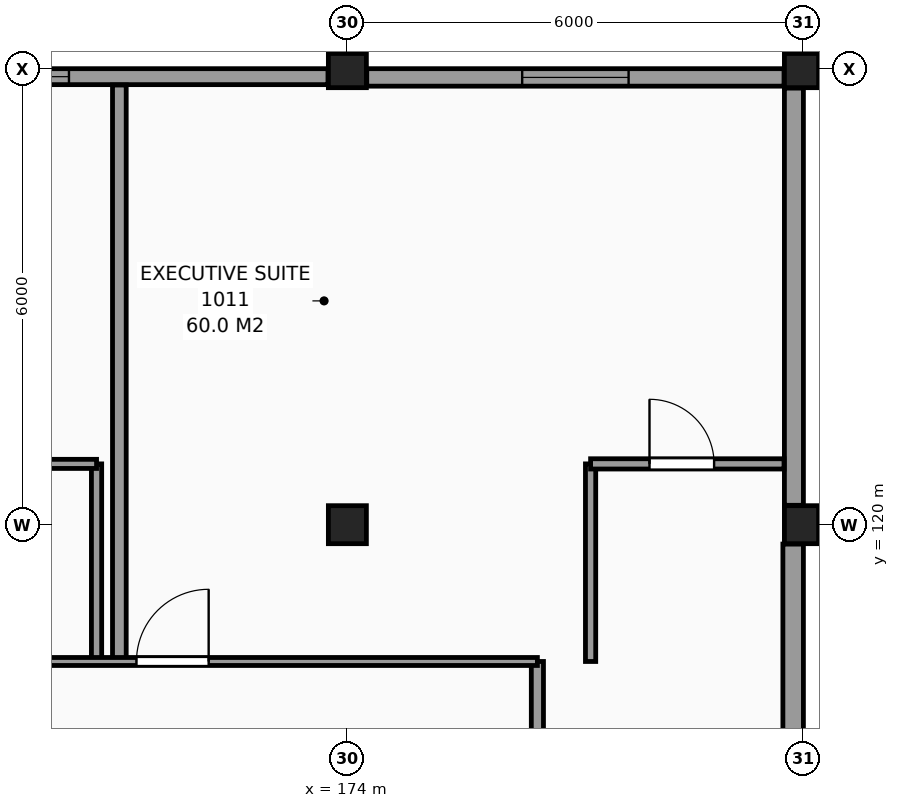
"""IFC4 building model, lengths in metres.
Left out: names, types, materials, properties, quantities, classifications, styles, units other than length and angle.
Written with IfcOpenShell. Run it as: python <this file> out.ifc"""

import sys

from ifc_helpers import new_model, si_unit, direction, frame, frame_2d, origin, origin_2d, place, context, subcontext, project, spatial, rectangle, extrude, element, fill, save


model = new_model("IFC4")
c1 = context("Model", 3, precision=1e-05, world=origin(), true_north=direction((0.0, 1.0)))
c2 = subcontext(c1, "Body", "Model", "MODEL_VIEW")
j1 = project(units=[si_unit("LENGTHUNIT", "METRE"), si_unit("PLANEANGLEUNIT", "RADIAN")], contexts=[c1])
p1 = place(None, origin())
s1 = spatial("IfcSite", under=j1, at=p1, CompositionType="ELEMENT")
p2 = place(p1, origin())
s2 = spatial("IfcBuilding", under=s1, at=p2, CompositionType="ELEMENT")
p3 = place(p2, frame((0.0, 0.0, 41.4)))
s3 = spatial("IfcBuildingStorey", under=s2, at=p3, CompositionType="ELEMENT", Elevation=41.4)
for number, where, z_axis, x_axis in (
    (1, (174.0, 120.0, 0.0), (0.0, 0.0, 1.0), (1.0, 0.0, 0.0)),
    (2, (174.0, 126.0, 0.0), (0.0, 0.0, 1.0), (1.0, 0.0, 0.0)),
    (3, (180.0, 120.0, 0.0), (0.0, 0.0, 1.0), (1.0, 0.0, 0.0)),
    (4, (180.0, 126.0, 0.0), (0.0, 0.0, 1.0), (1.0, 0.0, 0.0)),
):
    element("IfcColumn", number, at=place(p3, frame(where, z_axis=z_axis, x_axis=x_axis)), inside=s3, PredefinedType="COLUMN", context=c2, shape_type="SweptSolid", body=[
        extrude(rectangle(XDim=0.5, YDim=0.5, at=origin_2d()), origin(), (0.0, 0.0, 1.0), 3.3),
    ])
p4 = place(p3, frame((179.865, 114.255, 0.0), z_axis=(0.0, 0.0, 1.0), x_axis=(0.0, 1.0, 0.0)))
e5 = element("IfcWall", 5, at=p4, inside=s3, PredefinedType="SOLIDWALL", context=c2, shape_type="SweptSolid", body=[
    extrude(rectangle(XDim=5.49, YDim=0.27, at=frame_2d((2.745, 0.0))), origin(), (0.0, 0.0, 1.0), 2.41),
])
p5 = place(p3, frame((179.875, 120.255, 0.0), z_axis=(0.0, 0.0, 1.0), x_axis=(0.0, 1.0, 0.0)))
e6 = element("IfcWall", 6, at=p5, inside=s3, PredefinedType="SOLIDWALL", context=c2, shape_type="SweptSolid", body=[
    extrude(rectangle(XDim=5.49, YDim=0.25, at=frame_2d((2.745, 0.0))), origin(), (0.0, 0.0, 1.0), 2.41),
])
p6 = place(p3, frame((179.745, 125.885, 0.0), z_axis=(0.0, 0.0, 1.0), x_axis=(-1.0, 0.0, 0.0)))
e7 = element("IfcWall", 7, at=p6, inside=s3, PredefinedType="SOLIDWALL", context=c2, shape_type="SweptSolid", body=[
    extrude(rectangle(XDim=5.49, YDim=0.23, at=frame_2d((2.745, 0.0))), origin(), (0.0, 0.0, 1.0), 2.41),
])
p7 = place(p6, frame((2.045, 0.0, 0.8)))
e8 = element("IfcOpeningElement", 8, at=p7, cuts=e7, PredefinedType="OPENING", context=c2, shape_type="SweptSolid", body=[
    extrude(rectangle(XDim=1.4, YDim=1.4, at=frame_2d((0.7, 0.7))), frame((0.0, 0.125, 0.0), z_axis=(0.0, -1.0, 0.0), x_axis=(1.0, 0.0, 0.0)), (0.0, 0.0, 1.0), 0.25),
])
p8 = place(p3, frame((173.745, 125.895, 0.0), z_axis=(0.0, 0.0, 1.0), x_axis=(-1.0, 0.0, 0.0)))
e9 = element("IfcWall", 9, at=p8, inside=s3, PredefinedType="SOLIDWALL", context=c2, shape_type="SweptSolid", body=[
    extrude(rectangle(XDim=5.49, YDim=0.21, at=frame_2d((2.745, 0.0))), origin(), (0.0, 0.0, 1.0), 2.41),
])
p9 = place(p8, frame((3.408, 0.0, 0.8)))
e10 = element("IfcOpeningElement", 10, at=p9, cuts=e9, PredefinedType="OPENING", context=c2, shape_type="SweptSolid", body=[
    extrude(rectangle(XDim=1.4, YDim=1.4, at=frame_2d((0.7, 0.7))), frame((0.0, 0.115, 0.0), z_axis=(0.0, -1.0, 0.0), x_axis=(1.0, 0.0, 0.0)), (0.0, 0.0, 1.0), 0.23),
])
p10 = place(p3, frame((170.7, 118.2, 0.0), z_axis=(0.0, 0.0, 1.0), x_axis=(0.0, 1.0, 0.0)))
e11 = element("IfcWall", 11, at=p10, inside=s3, PredefinedType="PARTITIONING", context=c2, shape_type="SweptSolid", body=[
    extrude(rectangle(XDim=2.6, YDim=0.135, at=frame_2d((1.3, 0.0))), origin(), (0.0, 0.0, 1.0), 3.06),
])
p11 = place(p3, frame((171.0, 118.2, 0.0), z_axis=(0.0, 0.0, 1.0), x_axis=(0.0, 1.0, 0.0)))
e12 = element("IfcWall", 12, at=p11, inside=s3, PredefinedType="PARTITIONING", context=c2, shape_type="SweptSolid", body=[
    extrude(rectangle(XDim=7.585, YDim=0.18, at=frame_2d((3.792, 0.0))), origin(), (0.0, 0.0, 1.0), 3.06),
])
p12 = place(p3, frame((176.5, 115.8, 0.0), z_axis=(0.0, 0.0, 1.0), x_axis=(0.0, 1.0, 0.0)))
e13 = element("IfcWall", 13, at=p12, inside=s3, PredefinedType="PARTITIONING", context=c2, shape_type="SweptSolid", body=[
    extrude(rectangle(XDim=2.4, YDim=0.16, at=frame_2d((1.2, 0.0))), origin(), (0.0, 0.0, 1.0), 3.06),
])
p13 = place(p3, frame((177.2, 118.2, 0.0), z_axis=(0.0, 0.0, 1.0), x_axis=(0.0, 1.0, 0.0)))
e14 = element("IfcWall", 14, at=p13, inside=s3, PredefinedType="PARTITIONING", context=c2, shape_type="SweptSolid", body=[
    extrude(rectangle(XDim=2.6, YDim=0.135, at=frame_2d((1.3, 0.0))), origin(), (0.0, 0.0, 1.0), 3.06),
])
p14 = place(p3, frame((102.275, 118.2, 0.0), z_axis=(0.0, 0.0, 1.0), x_axis=(1.0, 0.0, 0.0)))
e15 = element("IfcWall", 15, at=p14, inside=s3, PredefinedType="PARTITIONING", context=c2, shape_type="SweptSolid", body=[
    extrude(rectangle(XDim=74.225, YDim=0.105, at=frame_2d((37.113, 0.0))), origin(), (0.0, 0.0, 1.0), 3.06),
])
p15 = place(p14, frame((7.55, 0.0, 0.0)))
e16 = element("IfcOpeningElement", 16, at=p15, cuts=e15, PredefinedType="OPENING", context=c2, shape_type="SweptSolid", body=[
    extrude(rectangle(XDim=0.95, YDim=2.1, at=frame_2d((0.475, 1.05))), frame((0.0, 0.062, 0.0), z_axis=(0.0, -1.0, 0.0), x_axis=(1.0, 0.0, 0.0)), (0.0, 0.0, 1.0), 0.125),
])
p16 = place(p14, frame((9.35, 0.0, 0.0)))
e17 = element("IfcOpeningElement", 17, at=p16, cuts=e15, PredefinedType="OPENING", context=c2, shape_type="SweptSolid", body=[
    extrude(rectangle(XDim=0.95, YDim=2.1, at=frame_2d((0.475, 1.05))), frame((0.0, 0.062, 0.0), z_axis=(0.0, -1.0, 0.0), x_axis=(1.0, 0.0, 0.0)), (0.0, 0.0, 1.0), 0.125),
])
p17 = place(p14, frame((24.05, 0.0, 0.0)))
e18 = element("IfcOpeningElement", 18, at=p17, cuts=e15, PredefinedType="OPENING", context=c2, shape_type="SweptSolid", body=[
    extrude(rectangle(XDim=0.95, YDim=2.1, at=frame_2d((0.475, 1.05))), frame((0.0, 0.062, 0.0), z_axis=(0.0, -1.0, 0.0), x_axis=(1.0, 0.0, 0.0)), (0.0, 0.0, 1.0), 0.125),
])
p18 = place(p14, frame((28.25, 0.0, 0.0)))
e19 = element("IfcOpeningElement", 19, at=p18, cuts=e15, PredefinedType="OPENING", context=c2, shape_type="SweptSolid", body=[
    extrude(rectangle(XDim=0.95, YDim=2.1, at=frame_2d((0.475, 1.05))), frame((0.0, 0.062, 0.0), z_axis=(0.0, -1.0, 0.0), x_axis=(1.0, 0.0, 0.0)), (0.0, 0.0, 1.0), 0.125),
])
p19 = place(p14, frame((30.45, 0.0, 0.0)))
e20 = element("IfcOpeningElement", 20, at=p19, cuts=e15, PredefinedType="OPENING", context=c2, shape_type="SweptSolid", body=[
    extrude(rectangle(XDim=0.95, YDim=2.1, at=frame_2d((0.475, 1.05))), frame((0.0, 0.062, 0.0), z_axis=(0.0, -1.0, 0.0), x_axis=(1.0, 0.0, 0.0)), (0.0, 0.0, 1.0), 0.125),
])
p20 = place(p14, frame((36.45, 0.0, 0.0)))
e21 = element("IfcOpeningElement", 21, at=p20, cuts=e15, PredefinedType="OPENING", context=c2, shape_type="SweptSolid", body=[
    extrude(rectangle(XDim=0.95, YDim=2.1, at=frame_2d((0.475, 1.05))), frame((0.0, 0.062, 0.0), z_axis=(0.0, -1.0, 0.0), x_axis=(1.0, 0.0, 0.0)), (0.0, 0.0, 1.0), 0.125),
])
p21 = place(p14, frame((46.25, 0.0, 0.0)))
e22 = element("IfcOpeningElement", 22, at=p21, cuts=e15, PredefinedType="OPENING", context=c2, shape_type="SweptSolid", body=[
    extrude(rectangle(XDim=0.95, YDim=2.1, at=frame_2d((0.475, 1.05))), frame((0.0, 0.062, 0.0), z_axis=(0.0, -1.0, 0.0), x_axis=(1.0, 0.0, 0.0)), (0.0, 0.0, 1.0), 0.125),
])
p22 = place(p14, frame((48.45, 0.0, 0.0)))
e23 = element("IfcOpeningElement", 23, at=p22, cuts=e15, PredefinedType="OPENING", context=c2, shape_type="SweptSolid", body=[
    extrude(rectangle(XDim=0.95, YDim=2.1, at=frame_2d((0.475, 1.05))), frame((0.0, 0.062, 0.0), z_axis=(0.0, -1.0, 0.0), x_axis=(1.0, 0.0, 0.0)), (0.0, 0.0, 1.0), 0.125),
])
p23 = place(p14, frame((62.3, 0.0, 0.0)))
e24 = element("IfcOpeningElement", 24, at=p23, cuts=e15, PredefinedType="OPENING", context=c2, shape_type="SweptSolid", body=[
    extrude(rectangle(XDim=0.95, YDim=2.1, at=frame_2d((0.475, 1.05))), frame((0.0, 0.062, 0.0), z_axis=(0.0, -1.0, 0.0), x_axis=(1.0, 0.0, 0.0)), (0.0, 0.0, 1.0), 0.125),
])
p24 = place(p14, frame((64.85, 0.0, 0.0)))
e25 = element("IfcOpeningElement", 25, at=p24, cuts=e15, PredefinedType="OPENING", context=c2, shape_type="SweptSolid", body=[
    extrude(rectangle(XDim=0.95, YDim=2.1, at=frame_2d((0.475, 1.05))), frame((0.0, 0.062, 0.0), z_axis=(0.0, -1.0, 0.0), x_axis=(1.0, 0.0, 0.0)), (0.0, 0.0, 1.0), 0.125),
])
p25 = place(p14, frame((68.95, 0.0, 0.0)))
e26 = element("IfcOpeningElement", 26, at=p25, cuts=e15, PredefinedType="OPENING", context=c2, shape_type="SweptSolid", body=[
    extrude(rectangle(XDim=0.95, YDim=2.1, at=frame_2d((0.475, 1.05))), frame((0.0, 0.062, 0.0), z_axis=(0.0, -1.0, 0.0), x_axis=(1.0, 0.0, 0.0)), (0.0, 0.0, 1.0), 0.125),
])
p26 = place(p3, frame((168.5, 120.8, 0.0), z_axis=(0.0, 0.0, 1.0), x_axis=(1.0, 0.0, 0.0)))
e27 = element("IfcWall", 27, at=p26, inside=s3, PredefinedType="PARTITIONING", context=c2, shape_type="SweptSolid", body=[
    extrude(rectangle(XDim=2.2, YDim=0.12, at=frame_2d((1.1, 0.0))), origin(), (0.0, 0.0, 1.0), 3.06),
])
p27 = place(p26, frame((0.675, 0.0, 0.0)))
e28 = element("IfcOpeningElement", 28, at=p27, cuts=e27, PredefinedType="OPENING", context=c2, shape_type="SweptSolid", body=[
    extrude(rectangle(XDim=0.85, YDim=2.1, at=frame_2d((0.425, 1.05))), frame((0.0, 0.07, 0.0), z_axis=(0.0, -1.0, 0.0), x_axis=(1.0, 0.0, 0.0)), (0.0, 0.0, 1.0), 0.14),
])
p28 = place(p3, frame((177.2, 120.8, 0.0), z_axis=(0.0, 0.0, 1.0), x_axis=(1.0, 0.0, 0.0)))
e29 = element("IfcWall", 29, at=p28, inside=s3, PredefinedType="PARTITIONING", context=c2, shape_type="SweptSolid", body=[
    extrude(rectangle(XDim=2.545, YDim=0.135, at=frame_2d((1.272, 0.0))), origin(), (0.0, 0.0, 1.0), 3.06),
])
p29 = place(p28, frame((0.775, 0.0, 0.0)))
e30 = element("IfcOpeningElement", 30, at=p29, cuts=e29, PredefinedType="OPENING", context=c2, shape_type="SweptSolid", body=[
    extrude(rectangle(XDim=0.85, YDim=2.1, at=frame_2d((0.425, 1.05))), frame((0.0, 0.078, 0.0), z_axis=(0.0, -1.0, 0.0), x_axis=(1.0, 0.0, 0.0)), (0.0, 0.0, 1.0), 0.155),
])
p30 = place(p9, origin())
e31 = element("IfcWindow", 31, at=p30, inside=s3, PartitioningType="SINGLE_PANEL", PredefinedType="WINDOW", context=c2, shape_type="SweptSolid", body=[
    extrude(rectangle(XDim=1.4, YDim=1.4, at=frame_2d((0.7, 0.7))), frame((0.0, 0.03, 0.0), z_axis=(0.0, -1.0, 0.0), x_axis=(1.0, 0.0, 0.0)), (0.0, 0.0, 1.0), 0.06),
])
fill(e10, e31)
p31 = place(p7, origin())
e32 = element("IfcWindow", 32, at=p31, inside=s3, PartitioningType="SINGLE_PANEL", PredefinedType="WINDOW", context=c2, shape_type="SweptSolid", body=[
    extrude(rectangle(XDim=1.4, YDim=1.4, at=frame_2d((0.7, 0.7))), frame((0.0, 0.03, 0.0), z_axis=(0.0, -1.0, 0.0), x_axis=(1.0, 0.0, 0.0)), (0.0, 0.0, 1.0), 0.06),
])
fill(e8, e32)
p32 = place(p29, origin())
e33 = element("IfcDoor", 33, at=p32, inside=s3, OperationType="SINGLE_SWING_LEFT", PredefinedType="DOOR", context=c2, shape_type="SweptSolid", body=[
    extrude(rectangle(XDim=0.85, YDim=2.1, at=frame_2d((0.425, 1.05))), frame((0.0, 0.025, 0.0), z_axis=(0.0, -1.0, 0.0), x_axis=(1.0, 0.0, 0.0)), (0.0, 0.0, 1.0), 0.05),
])
fill(e30, e33)
p33 = place(p25, origin())
e34 = element("IfcDoor", 34, at=p33, inside=s3, OperationType="SINGLE_SWING_RIGHT", PredefinedType="DOOR", context=c2, shape_type="SweptSolid", body=[
    extrude(rectangle(XDim=0.95, YDim=2.1, at=frame_2d((0.475, 1.05))), frame((0.0, 0.025, 0.0), z_axis=(0.0, -1.0, 0.0), x_axis=(1.0, 0.0, 0.0)), (0.0, 0.0, 1.0), 0.05),
])
fill(e26, e34)
save(model, sys.argv[1])
